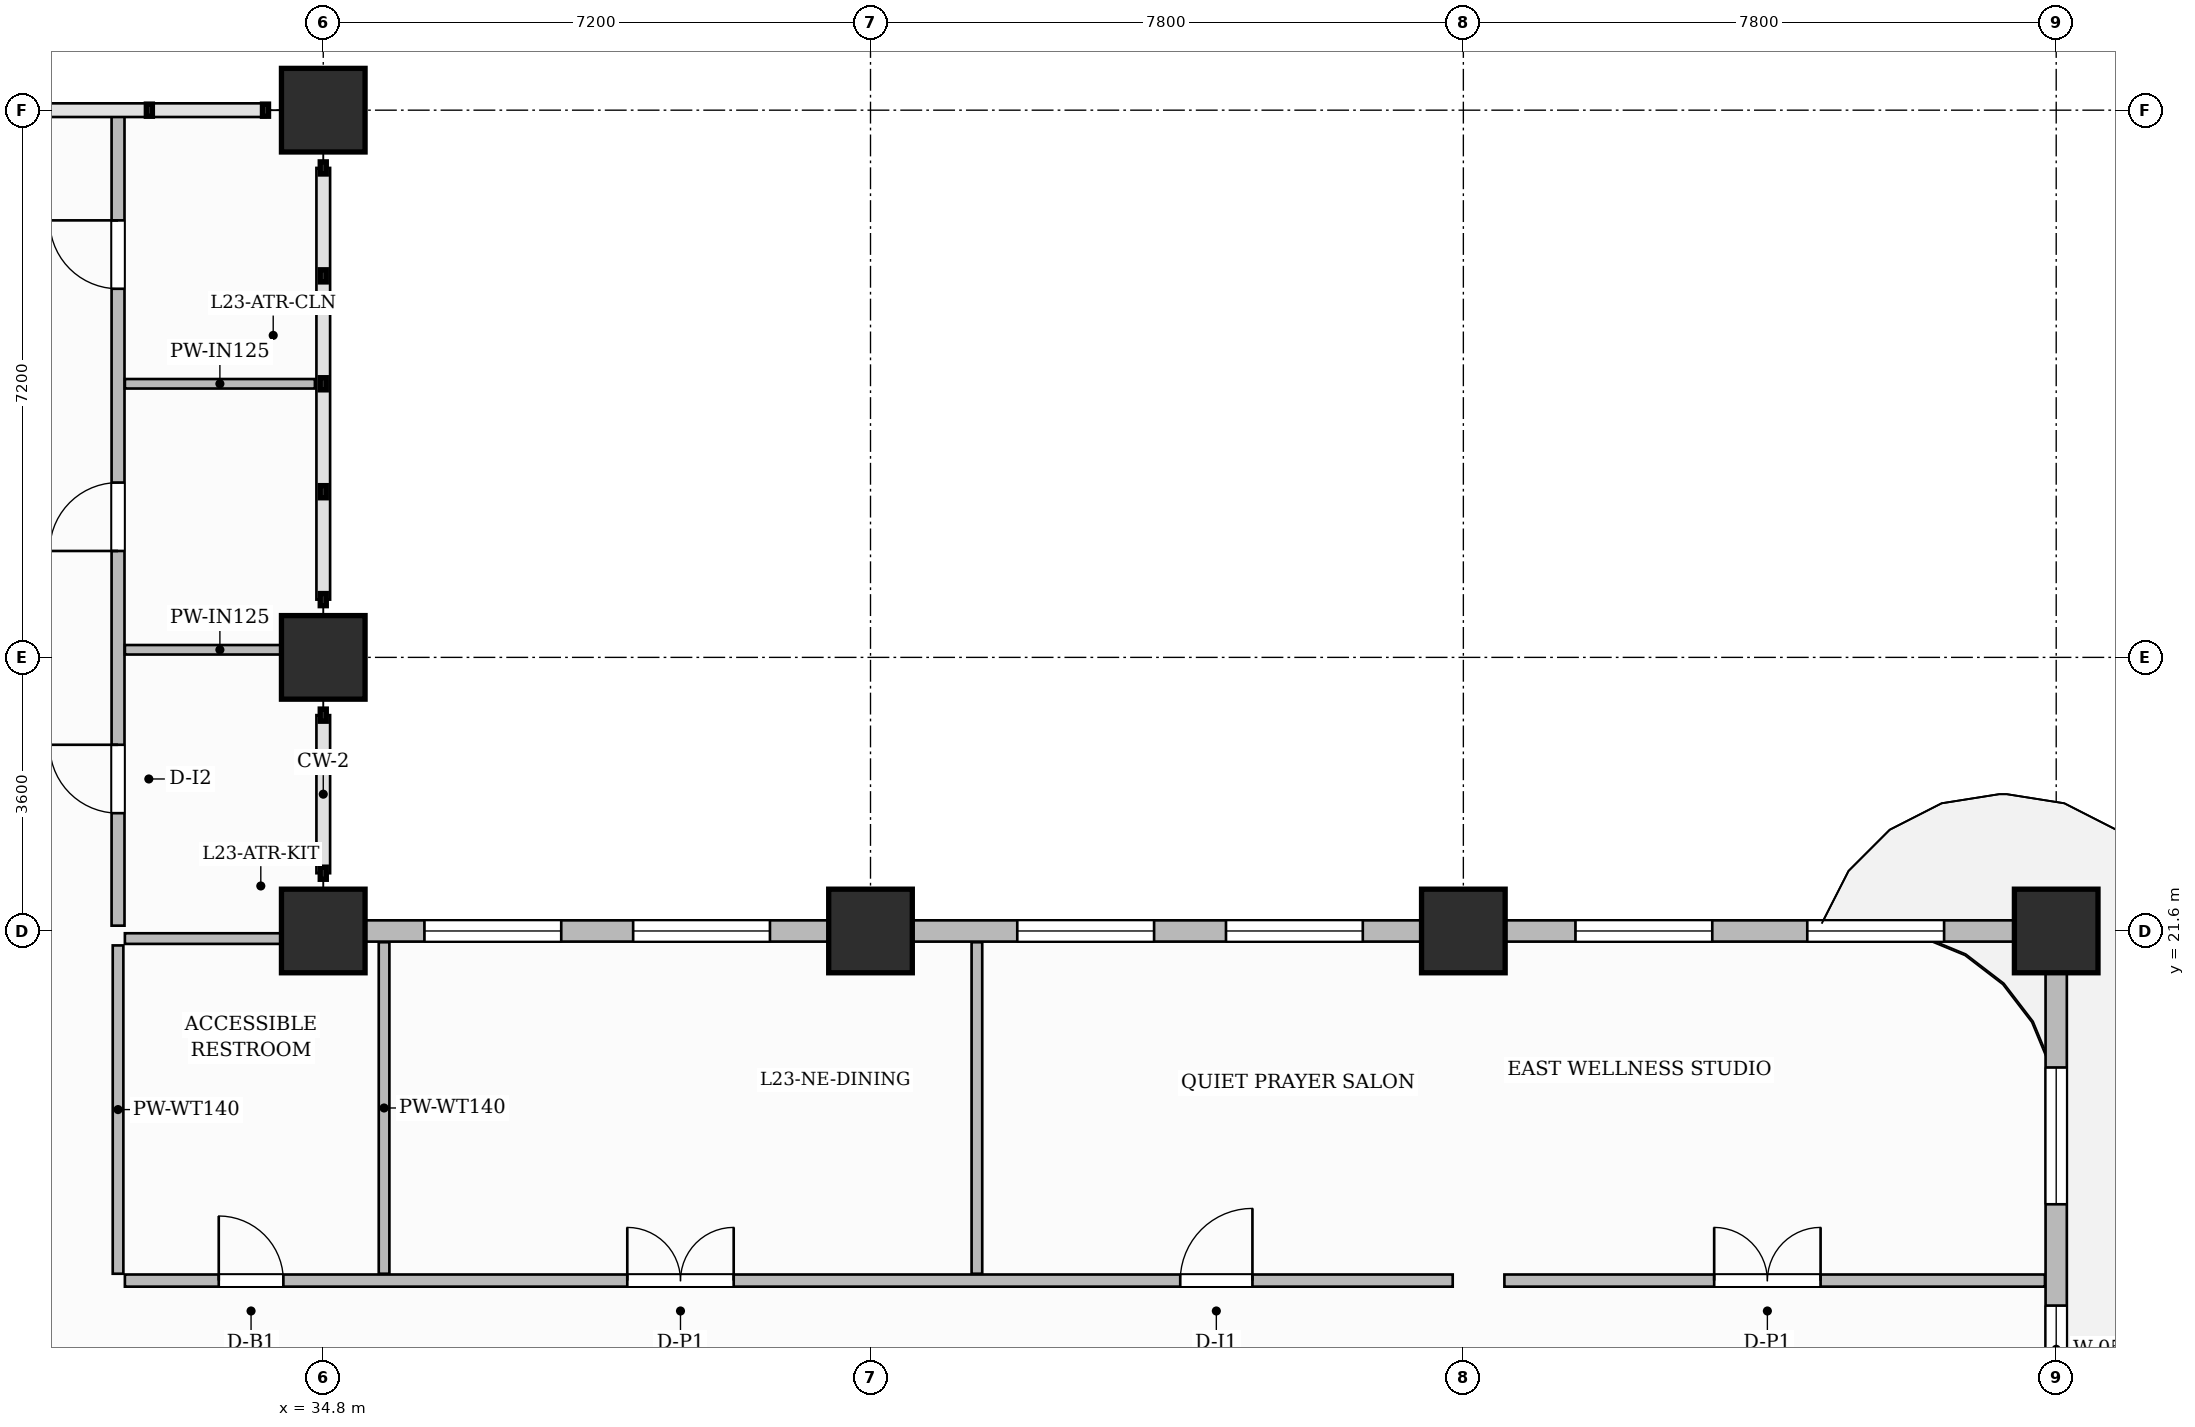
"""IFC4 building model, lengths in metres.
Left out: names, types, materials, properties, quantities, classifications, styles, units other than length and angle.
Written with IfcOpenShell. Run it as: python <this file> out.ifc"""

import sys

from ifc_helpers import new_model, si_unit, direction, frame, frame_2d, origin, origin_2d, place, context, subcontext, project, spatial, rectangle, extrude, source, transform, mapped, element, fill, save


model = new_model("IFC4")
c1 = context("Model", 3, precision=1e-05, world=origin(), true_north=direction((0.0, 1.0)))
c2 = subcontext(c1, "Body", "Model", "MODEL_VIEW")
j1 = project(units=[si_unit("LENGTHUNIT", "METRE"), si_unit("PLANEANGLEUNIT", "RADIAN")], contexts=[c1])
p1 = place(None, origin())
s1 = spatial("IfcSite", under=j1, at=p1, CompositionType="ELEMENT")
p2 = place(p1, origin())
s2 = spatial("IfcBuilding", under=s1, at=p2, CompositionType="ELEMENT")
p3 = place(p2, frame((0.0, 0.0, 95.3)))
s3 = spatial("IfcBuildingStorey", under=s2, at=p3, CompositionType="ELEMENT", Elevation=95.3)
m1 = source(origin(), c2, "Body", "SweptSolid", [
    extrude(rectangle(XDim=1.1, YDim=1.1, at=origin_2d()), origin(), (0.0, 0.0, 1.0), 3.7),
])
for number, where, z_axis, x_axis in (
    (1, (34.8, 21.6, 0.0), (0.0, 0.0, 1.0), (1.0, 0.0, 0.0)),
    (2, (34.8, 25.2, 0.0), (0.0, 0.0, 1.0), (1.0, 0.0, 0.0)),
    (3, (34.8, 32.4, 0.0), (0.0, 0.0, 1.0), (1.0, 0.0, 0.0)),
    (4, (42.0, 21.6, 0.0), (0.0, 0.0, 1.0), (1.0, 0.0, 0.0)),
    (5, (49.8, 21.6, 0.0), (0.0, 0.0, 1.0), (1.0, 0.0, 0.0)),
    (6, (57.6, 21.6, 0.0), (0.0, 0.0, 1.0), (1.0, 0.0, 0.0)),
):
    element("IfcColumn", number, at=place(p3, frame(where, z_axis=z_axis, x_axis=x_axis)), inside=s3, PredefinedType="COLUMN", context=c2, shape_type="MappedRepresentation", body=[
        mapped(m1, transform((0.0, 0.0, 0.0), scale=1.0)),
    ])
p4 = place(p3, frame((32.19, 17.0, 0.0), z_axis=(0.0, 0.0, 1.0), x_axis=(1.0, 0.0, 0.0)))
e7 = element("IfcWall", 7, at=p4, inside=s3, PredefinedType="PARTITIONING", context=c2, shape_type="SweptSolid", body=[
    extrude(rectangle(XDim=17.47, YDim=0.16, at=frame_2d((8.735, 0.0))), origin(), (0.0, 0.0, 1.0), 3.45),
])
p5 = place(p4, frame((1.235, 0.0, 0.0)))
e8 = element("IfcOpeningElement", 8, at=p5, cuts=e7, PredefinedType="OPENING", context=c2, shape_type="SweptSolid", body=[
    extrude(rectangle(XDim=0.85, YDim=2.1, at=frame_2d((0.425, 1.05))), frame((0.0, 0.09, 0.0), z_axis=(0.0, -1.0, 0.0), x_axis=(1.0, 0.0, 0.0)), (0.0, 0.0, 1.0), 0.18),
])
p6 = place(p4, frame((6.61, 0.0, 0.0)))
e9 = element("IfcOpeningElement", 9, at=p6, cuts=e7, PredefinedType="OPENING", context=c2, shape_type="SweptSolid", body=[
    extrude(rectangle(XDim=1.4, YDim=2.35, at=frame_2d((0.7, 1.175))), frame((0.0, 0.09, 0.0), z_axis=(0.0, -1.0, 0.0), x_axis=(1.0, 0.0, 0.0)), (0.0, 0.0, 1.0), 0.18),
])
p7 = place(p4, frame((13.885, 0.0, 0.0)))
e10 = element("IfcOpeningElement", 10, at=p7, cuts=e7, PredefinedType="OPENING", context=c2, shape_type="SweptSolid", body=[
    extrude(rectangle(XDim=0.95, YDim=2.15, at=frame_2d((0.475, 1.075))), frame((0.0, 0.09, 0.0), z_axis=(0.0, -1.0, 0.0), x_axis=(1.0, 0.0, 0.0)), (0.0, 0.0, 1.0), 0.18),
])
p8 = place(p3, frame((50.34, 17.0, 0.0), z_axis=(0.0, 0.0, 1.0), x_axis=(1.0, 0.0, 0.0)))
e11 = element("IfcWall", 11, at=p8, inside=s3, PredefinedType="PARTITIONING", context=c2, shape_type="SweptSolid", body=[
    extrude(rectangle(XDim=7.112, YDim=0.16, at=frame_2d((3.556, 0.0))), origin(), (0.0, 0.0, 1.0), 3.45),
])
p9 = place(p8, frame((2.76, 0.0, 0.0)))
e12 = element("IfcOpeningElement", 12, at=p9, cuts=e11, PredefinedType="OPENING", context=c2, shape_type="SweptSolid", body=[
    extrude(rectangle(XDim=1.4, YDim=2.35, at=frame_2d((0.7, 1.175))), frame((0.0, 0.09, 0.0), z_axis=(0.0, -1.0, 0.0), x_axis=(1.0, 0.0, 0.0)), (0.0, 0.0, 1.0), 0.18),
])
p10 = place(p3, frame((32.1, 17.09, 0.0), z_axis=(0.0, 0.0, 1.0), x_axis=(0.0, 1.0, 0.0)))
e13 = element("IfcWall", 13, at=p10, inside=s3, PredefinedType="PARTITIONING", context=c2, shape_type="SweptSolid", body=[
    extrude(rectangle(XDim=4.32, YDim=0.14, at=frame_2d((2.16, 0.0))), origin(), (0.0, 0.0, 1.0), 3.45),
])
for number, where, z_axis, x_axis in (
    (14, (35.6, 17.09, 0.0), (0.0, 0.0, 1.0), (0.0, 1.0, 0.0)),
    (15, (43.4, 17.09, 0.0), (0.0, 0.0, 1.0), (0.0, 1.0, 0.0)),
):
    element("IfcWall", number, at=place(p3, frame(where, z_axis=z_axis, x_axis=x_axis)), inside=s3, PredefinedType="PARTITIONING", context=c2, shape_type="SweptSolid", body=[
        extrude(rectangle(XDim=4.362, YDim=0.14, at=frame_2d((2.181, 0.0))), origin(), (0.0, 0.0, 1.0), 3.45),
    ])
p11 = place(p3, frame((32.19, 21.5, 0.0), z_axis=(0.0, 0.0, 1.0), x_axis=(1.0, 0.0, 0.0)))
e16 = element("IfcWall", 16, at=p11, inside=s3, PredefinedType="PARTITIONING", context=c2, shape_type="SweptSolid", body=[
    extrude(rectangle(XDim=2.42, YDim=0.14, at=frame_2d((1.21, 0.0))), origin(), (0.0, 0.0, 1.0), 2.885),
])
p12 = place(p3, frame((32.1, 21.67, 0.0), z_axis=(0.0, 0.0, 1.0), x_axis=(0.0, 1.0, 0.0)))
e17 = element("IfcWall", 17, at=p12, inside=s3, PredefinedType="PARTITIONING", context=c2, shape_type="SweptSolid", body=[
    extrude(rectangle(XDim=10.702, YDim=0.17, at=frame_2d((5.351, 0.0))), origin(), (0.0, 0.0, 1.0), 3.45),
])
p13 = place(p12, frame((1.48, 0.0, 0.0)))
e18 = element("IfcOpeningElement", 18, at=p13, cuts=e17, PredefinedType="OPENING", context=c2, shape_type="SweptSolid", body=[
    extrude(rectangle(XDim=0.9, YDim=2.15, at=frame_2d((0.45, 1.075))), frame((0.0, 0.095, 0.0), z_axis=(0.0, -1.0, 0.0), x_axis=(1.0, 0.0, 0.0)), (0.0, 0.0, 1.0), 0.19),
])
p14 = place(p12, frame((4.93, 0.0, 0.0)))
e19 = element("IfcOpeningElement", 19, at=p14, cuts=e17, PredefinedType="OPENING", context=c2, shape_type="SweptSolid", body=[
    extrude(rectangle(XDim=0.9, YDim=2.15, at=frame_2d((0.45, 1.075))), frame((0.0, 0.095, 0.0), z_axis=(0.0, -1.0, 0.0), x_axis=(1.0, 0.0, 0.0)), (0.0, 0.0, 1.0), 0.19),
])
p15 = place(p12, frame((8.38, 0.0, 0.0)))
e20 = element("IfcOpeningElement", 20, at=p15, cuts=e17, PredefinedType="OPENING", context=c2, shape_type="SweptSolid", body=[
    extrude(rectangle(XDim=0.9, YDim=2.15, at=frame_2d((0.45, 1.075))), frame((0.0, 0.095, 0.0), z_axis=(0.0, -1.0, 0.0), x_axis=(1.0, 0.0, 0.0)), (0.0, 0.0, 1.0), 0.19),
])
for number, where, z_axis, x_axis in (
    (21, (32.19, 25.3, 0.0), (0.0, 0.0, 1.0), (1.0, 0.0, 0.0)),
    (22, (32.19, 28.8, 0.0), (0.0, 0.0, 1.0), (1.0, 0.0, 0.0)),
):
    element("IfcWall", number, at=place(p3, frame(where, z_axis=z_axis, x_axis=x_axis)), inside=s3, PredefinedType="PARTITIONING", context=c2, shape_type="SweptSolid", body=[
        extrude(rectangle(XDim=2.5, YDim=0.125, at=frame_2d((1.25, 0.0))), origin(), (0.0, 0.0, 1.0), 3.45),
    ])
p16 = place(p3, frame((57.6, 0.05, 0.0), z_axis=(0.0, 0.0, 1.0), x_axis=(0.0, 1.0, 0.0)))
e23 = element("IfcWall", 23, at=p16, inside=s3, PredefinedType="SOLIDWALL", context=c2, shape_type="SweptSolid", body=[
    extrude(rectangle(XDim=21.5, YDim=0.28, at=frame_2d((10.75, 0.0))), origin(), (0.0, 0.0, 1.0), 2.885),
])
p17 = place(p16, frame((2.75, 0.0, 0.0)))
e24 = element("IfcOpeningElement", 24, at=p17, cuts=e23, PredefinedType="OPENING", context=c2, shape_type="SweptSolid", body=[
    extrude(rectangle(XDim=1.2, YDim=2.2, at=frame_2d((0.6, 1.1))), frame((0.0, 0.15, 0.0), z_axis=(0.0, -1.0, 0.0), x_axis=(1.0, 0.0, 0.0)), (0.0, 0.0, 1.0), 0.3),
])
p18 = place(p16, frame((1.025, 0.0, 0.8)))
e25 = element("IfcOpeningElement", 25, at=p18, cuts=e23, PredefinedType="OPENING", context=c2, shape_type="SweptSolid", body=[
    extrude(rectangle(XDim=1.15, YDim=1.8, at=frame_2d((0.575, 0.9))), frame((0.0, 0.15, 0.0), z_axis=(0.0, -1.0, 0.0), x_axis=(1.0, 0.0, 0.0)), (0.0, 0.0, 1.0), 0.3),
])
p19 = place(p16, frame((4.6, 0.0, 0.8)))
e26 = element("IfcOpeningElement", 26, at=p19, cuts=e23, PredefinedType="OPENING", context=c2, shape_type="SweptSolid", body=[
    extrude(rectangle(XDim=1.4, YDim=1.85, at=frame_2d((0.7, 0.925))), frame((0.0, 0.15, 0.0), z_axis=(0.0, -1.0, 0.0), x_axis=(1.0, 0.0, 0.0)), (0.0, 0.0, 1.0), 0.3),
])
p20 = place(p16, frame((8.475, 0.0, 0.8)))
e27 = element("IfcOpeningElement", 27, at=p20, cuts=e23, PredefinedType="OPENING", context=c2, shape_type="SweptSolid", body=[
    extrude(rectangle(XDim=1.8, YDim=1.85, at=frame_2d((0.9, 0.925))), frame((0.0, 0.15, 0.0), z_axis=(0.0, -1.0, 0.0), x_axis=(1.0, 0.0, 0.0)), (0.0, 0.0, 1.0), 0.3),
])
p21 = place(p16, frame((11.225, 0.0, 0.8)))
e28 = element("IfcOpeningElement", 28, at=p21, cuts=e23, PredefinedType="OPENING", context=c2, shape_type="SweptSolid", body=[
    extrude(rectangle(XDim=1.8, YDim=1.85, at=frame_2d((0.9, 0.925))), frame((0.0, 0.15, 0.0), z_axis=(0.0, -1.0, 0.0), x_axis=(1.0, 0.0, 0.0)), (0.0, 0.0, 1.0), 0.3),
])
p22 = place(p16, frame((15.471, 0.0, 0.8)))
e29 = element("IfcOpeningElement", 29, at=p22, cuts=e23, PredefinedType="OPENING", context=c2, shape_type="SweptSolid", body=[
    extrude(rectangle(XDim=1.15, YDim=1.8, at=frame_2d((0.575, 0.9))), frame((0.0, 0.15, 0.0), z_axis=(0.0, -1.0, 0.0), x_axis=(1.0, 0.0, 0.0)), (0.0, 0.0, 1.0), 0.3),
])
p23 = place(p16, frame((17.954, 0.0, 0.8)))
e30 = element("IfcOpeningElement", 30, at=p23, cuts=e23, PredefinedType="OPENING", context=c2, shape_type="SweptSolid", body=[
    extrude(rectangle(XDim=1.8, YDim=1.85, at=frame_2d((0.9, 0.925))), frame((0.0, 0.15, 0.0), z_axis=(0.0, -1.0, 0.0), x_axis=(1.0, 0.0, 0.0)), (0.0, 0.0, 1.0), 0.3),
])
p24 = place(p3, frame((34.8, 21.6, 0.0), z_axis=(0.0, 0.0, 1.0), x_axis=(1.0, 0.0, 0.0)))
e31 = element("IfcWall", 31, at=p24, inside=s3, PredefinedType="SOLIDWALL", context=c2, shape_type="SweptSolid", body=[
    extrude(rectangle(XDim=22.8, YDim=0.28, at=frame_2d((11.4, 0.0))), origin(), (0.0, 0.0, 1.0), 2.885),
])
p25 = place(p24, frame((1.331, 0.0, 0.8)))
e32 = element("IfcOpeningElement", 32, at=p25, cuts=e31, PredefinedType="OPENING", context=c2, shape_type="SweptSolid", body=[
    extrude(rectangle(XDim=1.8, YDim=1.85, at=frame_2d((0.9, 0.925))), frame((0.0, 0.15, 0.0), z_axis=(0.0, -1.0, 0.0), x_axis=(1.0, 0.0, 0.0)), (0.0, 0.0, 1.0), 0.3),
])
p26 = place(p24, frame((4.077, 0.0, 0.8)))
e33 = element("IfcOpeningElement", 33, at=p26, cuts=e31, PredefinedType="OPENING", context=c2, shape_type="SweptSolid", body=[
    extrude(rectangle(XDim=1.8, YDim=1.85, at=frame_2d((0.9, 0.925))), frame((0.0, 0.15, 0.0), z_axis=(0.0, -1.0, 0.0), x_axis=(1.0, 0.0, 0.0)), (0.0, 0.0, 1.0), 0.3),
])
p27 = place(p24, frame((9.131, 0.0, 0.8)))
e34 = element("IfcOpeningElement", 34, at=p27, cuts=e31, PredefinedType="OPENING", context=c2, shape_type="SweptSolid", body=[
    extrude(rectangle(XDim=1.8, YDim=1.85, at=frame_2d((0.9, 0.925))), frame((0.0, 0.15, 0.0), z_axis=(0.0, -1.0, 0.0), x_axis=(1.0, 0.0, 0.0)), (0.0, 0.0, 1.0), 0.3),
])
p28 = place(p24, frame((11.877, 0.0, 0.8)))
e35 = element("IfcOpeningElement", 35, at=p28, cuts=e31, PredefinedType="OPENING", context=c2, shape_type="SweptSolid", body=[
    extrude(rectangle(XDim=1.8, YDim=1.85, at=frame_2d((0.9, 0.925))), frame((0.0, 0.15, 0.0), z_axis=(0.0, -1.0, 0.0), x_axis=(1.0, 0.0, 0.0)), (0.0, 0.0, 1.0), 0.3),
])
p29 = place(p24, frame((16.475, 0.0, 0.8)))
e36 = element("IfcOpeningElement", 36, at=p29, cuts=e31, PredefinedType="OPENING", context=c2, shape_type="SweptSolid", body=[
    extrude(rectangle(XDim=1.8, YDim=1.85, at=frame_2d((0.9, 0.925))), frame((0.0, 0.15, 0.0), z_axis=(0.0, -1.0, 0.0), x_axis=(1.0, 0.0, 0.0)), (0.0, 0.0, 1.0), 0.3),
])
p30 = place(p24, frame((19.525, 0.0, 0.8)))
e37 = element("IfcOpeningElement", 37, at=p30, cuts=e31, PredefinedType="OPENING", context=c2, shape_type="SweptSolid", body=[
    extrude(rectangle(XDim=1.8, YDim=1.85, at=frame_2d((0.9, 0.925))), frame((0.0, 0.15, 0.0), z_axis=(0.0, -1.0, 0.0), x_axis=(1.0, 0.0, 0.0)), (0.0, 0.0, 1.0), 0.3),
])
m2 = source(origin(), c2, "Body", "SweptSolid", [
    extrude(rectangle(XDim=1.4, YDim=2.35, at=frame_2d((0.7, 1.175))), frame((0.0, 0.025, 0.0), z_axis=(0.0, -1.0, 0.0), x_axis=(1.0, 0.0, 0.0)), (0.0, 0.0, 1.0), 0.05),
])
p31 = place(p9, origin())
e38 = element("IfcDoor", 38, at=p31, inside=s3, OperationType="DOUBLE_DOOR_SINGLE_SWING", PredefinedType="DOOR", context=c2, shape_type="MappedRepresentation", body=[
    mapped(m2, transform((0.0, 0.0, 0.0), scale=1.0)),
])
fill(e12, e38)
m3 = source(origin(), c2, "Body", "SweptSolid", [
    extrude(rectangle(XDim=0.85, YDim=2.1, at=frame_2d((0.425, 1.05))), frame((0.0, 0.025, 0.0), z_axis=(0.0, -1.0, 0.0), x_axis=(1.0, 0.0, 0.0)), (0.0, 0.0, 1.0), 0.05),
])
p32 = place(p5, origin())
e39 = element("IfcDoor", 39, at=p32, inside=s3, OperationType="SINGLE_SWING_LEFT", PredefinedType="DOOR", context=c2, shape_type="MappedRepresentation", body=[
    mapped(m3, transform((0.0, 0.0, 0.0), scale=1.0)),
])
fill(e8, e39)
p33 = place(p6, origin())
e40 = element("IfcDoor", 40, at=p33, inside=s3, OperationType="DOUBLE_DOOR_SINGLE_SWING", PredefinedType="DOOR", context=c2, shape_type="MappedRepresentation", body=[
    mapped(m2, transform((0.0, 0.0, 0.0), scale=1.0)),
])
fill(e9, e40)
m4 = source(origin(), c2, "Body", "SweptSolid", [
    extrude(rectangle(XDim=0.95, YDim=2.15, at=frame_2d((0.475, 1.075))), frame((0.0, 0.025, 0.0), z_axis=(0.0, -1.0, 0.0), x_axis=(1.0, 0.0, 0.0)), (0.0, 0.0, 1.0), 0.05),
])
p34 = place(p7, origin())
e41 = element("IfcDoor", 41, at=p34, inside=s3, OperationType="SINGLE_SWING_RIGHT", PredefinedType="DOOR", context=c2, shape_type="MappedRepresentation", body=[
    mapped(m4, transform((0.0, 0.0, 0.0), scale=1.0)),
])
fill(e10, e41)
m5 = source(origin(), c2, "Body", "SweptSolid", [
    extrude(rectangle(XDim=0.9, YDim=2.15, at=frame_2d((0.45, 1.075))), frame((0.0, 0.025, 0.0), z_axis=(0.0, -1.0, 0.0), x_axis=(1.0, 0.0, 0.0)), (0.0, 0.0, 1.0), 0.05),
])
p35 = place(p13, origin())
e42 = element("IfcDoor", 42, at=p35, inside=s3, OperationType="SINGLE_SWING_RIGHT", PredefinedType="DOOR", context=c2, shape_type="MappedRepresentation", body=[
    mapped(m5, transform((0.0, 0.0, 0.0), scale=1.0)),
])
fill(e18, e42)
p36 = place(p14, origin())
e43 = element("IfcDoor", 43, at=p36, inside=s3, OperationType="SINGLE_SWING_LEFT", PredefinedType="DOOR", context=c2, shape_type="MappedRepresentation", body=[
    mapped(m5, transform((0.0, 0.0, 0.0), scale=1.0)),
])
fill(e19, e43)
p37 = place(p15, origin())
e44 = element("IfcDoor", 44, at=p37, inside=s3, OperationType="SINGLE_SWING_RIGHT", PredefinedType="DOOR", context=c2, shape_type="MappedRepresentation", body=[
    mapped(m5, transform((0.0, 0.0, 0.0), scale=1.0)),
])
fill(e20, e44)
m6 = source(origin(), c2, "Body", "SweptSolid", [
    extrude(rectangle(XDim=1.15, YDim=1.8, at=frame_2d((0.575, 0.9))), frame((0.0, 0.03, 0.0), z_axis=(0.0, -1.0, 0.0), x_axis=(1.0, 0.0, 0.0)), (0.0, 0.0, 1.0), 0.06),
])
p38 = place(p22, origin())
e45 = element("IfcWindow", 45, at=p38, inside=s3, PartitioningType="SINGLE_PANEL", PredefinedType="WINDOW", context=c2, shape_type="MappedRepresentation", body=[
    mapped(m6, transform((0.0, 0.0, 0.0), scale=1.0)),
])
fill(e29, e45)
m7 = source(origin(), c2, "Body", "SweptSolid", [
    extrude(rectangle(XDim=1.8, YDim=1.85, at=frame_2d((0.9, 0.925))), frame((0.0, 0.03, 0.0), z_axis=(0.0, -1.0, 0.0), x_axis=(1.0, 0.0, 0.0)), (0.0, 0.0, 1.0), 0.06),
])
p39 = place(p23, origin())
e46 = element("IfcWindow", 46, at=p39, inside=s3, PartitioningType="DOUBLE_PANEL_VERTICAL", PredefinedType="WINDOW", context=c2, shape_type="MappedRepresentation", body=[
    mapped(m7, transform((0.0, 0.0, 0.0), scale=1.0)),
])
fill(e30, e46)
p40 = place(p25, origin())
e47 = element("IfcWindow", 47, at=p40, inside=s3, PartitioningType="DOUBLE_PANEL_VERTICAL", PredefinedType="WINDOW", context=c2, shape_type="MappedRepresentation", body=[
    mapped(m7, transform((0.0, 0.0, 0.0), scale=1.0)),
])
fill(e32, e47)
p41 = place(p26, origin())
e48 = element("IfcWindow", 48, at=p41, inside=s3, PartitioningType="DOUBLE_PANEL_VERTICAL", PredefinedType="WINDOW", context=c2, shape_type="MappedRepresentation", body=[
    mapped(m7, transform((0.0, 0.0, 0.0), scale=1.0)),
])
fill(e33, e48)
p42 = place(p27, origin())
e49 = element("IfcWindow", 49, at=p42, inside=s3, PartitioningType="DOUBLE_PANEL_VERTICAL", PredefinedType="WINDOW", context=c2, shape_type="MappedRepresentation", body=[
    mapped(m7, transform((0.0, 0.0, 0.0), scale=1.0)),
])
fill(e34, e49)
p43 = place(p28, origin())
e50 = element("IfcWindow", 50, at=p43, inside=s3, PartitioningType="DOUBLE_PANEL_VERTICAL", PredefinedType="WINDOW", context=c2, shape_type="MappedRepresentation", body=[
    mapped(m7, transform((0.0, 0.0, 0.0), scale=1.0)),
])
fill(e35, e50)
p44 = place(p29, origin())
e51 = element("IfcWindow", 51, at=p44, inside=s3, PartitioningType="DOUBLE_PANEL_VERTICAL", PredefinedType="WINDOW", context=c2, shape_type="MappedRepresentation", body=[
    mapped(m7, transform((0.0, 0.0, 0.0), scale=1.0)),
])
fill(e36, e51)
p45 = place(p30, origin())
e52 = element("IfcWindow", 52, at=p45, inside=s3, PartitioningType="DOUBLE_PANEL_VERTICAL", PredefinedType="WINDOW", context=c2, shape_type="MappedRepresentation", body=[
    mapped(m7, transform((0.0, 0.0, 0.0), scale=1.0)),
])
fill(e37, e52)
save(model, sys.argv[1])
